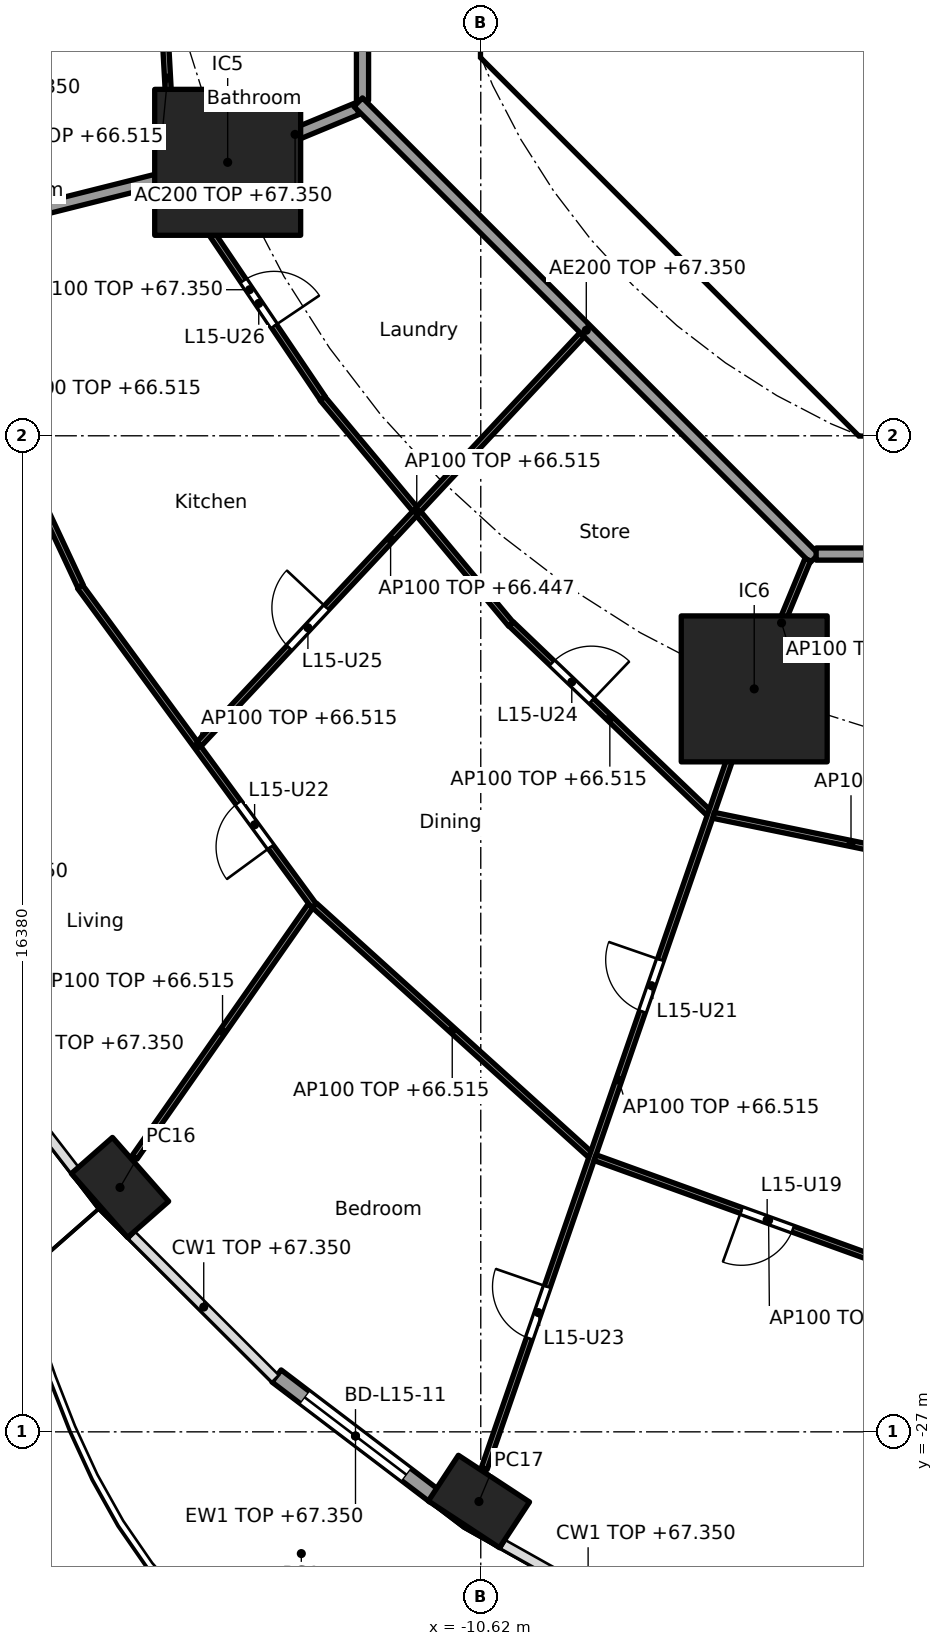
"""IFC4 building model, lengths in metres.
Left out: names, types, materials, properties, quantities, classifications, styles, units other than length and angle.
Written with IfcOpenShell. Run it as: python <this file> out.ifc"""

import sys

from ifc_helpers import new_model, si_unit, direction, frame, frame_2d, origin, origin_2d, place, context, subcontext, project, spatial, polyline, rectangle, hollow_rectangle, outline, extrude, element, fill, save


model = new_model("IFC4")
c1 = context("Model", 3, precision=1e-05, world=origin(), true_north=direction((0.0, 1.0)))
c2 = subcontext(c1, "Body", "Model", "MODEL_VIEW")
j1 = project(units=[si_unit("LENGTHUNIT", "METRE"), si_unit("PLANEANGLEUNIT", "RADIAN")], contexts=[c1])
p1 = place(None, origin())
s1 = spatial("IfcSite", under=j1, at=p1, CompositionType="ELEMENT")
p2 = place(p1, origin())
s2 = spatial("IfcBuilding", under=s1, at=p2, CompositionType="ELEMENT")
p3 = place(p2, frame((0.0, 0.0, 64.0)))
s3 = spatial("IfcBuildingStorey", under=s2, at=p3, CompositionType="ELEMENT", Elevation=64.0)
for number, where, z_axis, x_axis in (
    (1, (-16.552, -22.981, 0.0), (0.0, 0.0, 1.0), (0.66, -0.751, 0.0)),
    (2, (-10.65, -28.146, 0.0), (0.0, 0.0, 1.0), (0.836, -0.549, 0.0)),
):
    element("IfcColumn", number, at=place(p3, frame(where, z_axis=z_axis, x_axis=x_axis)), inside=s3, PredefinedType="COLUMN", context=c2, shape_type="SweptSolid", body=[
        extrude(hollow_rectangle(XDim=1.4, YDim=0.9, WallThickness=0.05, at=origin_2d()), origin(), (0.0, 0.0, 1.0), 3.7),
    ])
for number, where, z_axis, x_axis in (
    (3, (-14.782, -6.123, 0.0), (0.0, 0.0, 1.0), (1.0, 0.0, 0.0)),
    (4, (-6.123, -14.782, 0.0), (0.0, 0.0, 1.0), (1.0, 0.0, 0.0)),
):
    element("IfcColumn", number, at=place(p3, frame(where, z_axis=z_axis, x_axis=x_axis)), inside=s3, PredefinedType="COLUMN", context=c2, shape_type="SweptSolid", body=[
        extrude(rectangle(XDim=2.4, YDim=2.4, at=origin_2d()), origin(), (0.0, 0.0, 1.0), 3.7),
    ])
p4 = place(p3, frame((-11.382, -28.056, 0.0), z_axis=(0.0, 0.0, 1.0), x_axis=(-0.796022293214, 0.605267303517, 0.0)))
e5 = element("IfcWall", 5, at=p4, inside=s3, PredefinedType="SOLIDWALL", context=c2, shape_type="SweptSolid", body=[
    extrude(rectangle(XDim=3.262, YDim=0.25, at=frame_2d((1.631, 0.0))), origin(), (0.0, 0.0, 1.0), 3.35),
])
p5 = place(p4, frame((0.581, 0.0, 0.0)))
e6 = element("IfcOpeningElement", 6, at=p5, cuts=e5, PredefinedType="OPENING", context=c2, shape_type="SweptSolid", body=[
    extrude(rectangle(XDim=2.1, YDim=2.4, at=frame_2d((1.05, 1.2))), frame((0.0, 0.135, 0.0), z_axis=(0.0, -1.0, 0.0), x_axis=(1.0, 0.0, 0.0)), (0.0, 0.0, 1.0), 0.27),
])
p6 = place(p3, frame((-9.988, -4.613, 0.0), z_axis=(0.0, 0.0, 1.0), x_axis=(0.707106781187, -0.707106781187, 0.0)))
e7 = element("IfcWall", 7, at=p6, inside=s3, PredefinedType="SHEAR", context=c2, shape_type="SweptSolid", body=[
    extrude(rectangle(XDim=7.602, YDim=0.6, at=frame_2d((3.801, 0.0))), origin(), (0.0, 0.0, 1.0), 3.35),
])
p7 = place(p6, frame((6.151, 0.0, 0.0)))
e8 = element("IfcOpeningElement", 8, at=p7, cuts=e7, PredefinedType="OPENING", context=c2, shape_type="SweptSolid", body=[
    extrude(rectangle(XDim=1.1, YDim=2.1, at=frame_2d((0.55, 1.05))), frame((0.0, 0.31, 0.0), z_axis=(0.0, -1.0, 0.0), x_axis=(1.0, 0.0, 0.0)), (0.0, 0.0, 1.0), 0.62),
])
p8 = place(p3, frame((-7.4, -6.627, 0.0), z_axis=(0.0, 0.0, 1.0), x_axis=(0.0, 1.0, 0.0)))
e9 = element("IfcWall", 9, at=p8, inside=s3, PredefinedType="PARTITIONING", context=c2, shape_type="SweptSolid", body=[
    extrude(rectangle(XDim=2.527, YDim=0.15, at=frame_2d((1.263, 0.0))), origin(), (0.0, 0.0, 1.0), 3.35),
])
p9 = place(p8, frame((0.776, 0.0, 0.0)))
e10 = element("IfcOpeningElement", 10, at=p9, cuts=e9, PredefinedType="OPENING", context=c2, shape_type="SweptSolid", body=[
    extrude(rectangle(XDim=0.9, YDim=2.1, at=frame_2d((0.45, 1.05))), frame((0.0, 0.085, 0.0), z_axis=(0.0, -1.0, 0.0), x_axis=(1.0, 0.0, 0.0)), (0.0, 0.0, 1.0), 0.17),
])
p10 = place(p3, origin())
e11 = element("IfcWall", 11, at=p10, inside=s3, PredefinedType="SHEAR", context=c2, shape_type="SweptSolid", body=[
    extrude(outline(polyline([(-10.625, -3.801), (-10.025, -3.801), (-10.025, -4.152), (-9.776, -4.401), (-10.2, -4.825), (-10.625, -4.401), (-10.625, -3.801)])), origin(), (0.0, 0.0, 1.0), 3.35),
])
p11 = place(p3, origin())
e12 = element("IfcWall", 12, at=p11, inside=s3, PredefinedType="SHEAR", context=c2, shape_type="SweptSolid", body=[
    extrude(outline(polyline([(-4.152, -10.025), (4.152, -10.025), (4.401, -9.776), (4.825, -10.2), (4.401, -10.625), (-4.401, -10.625), (-4.825, -10.2), (-4.401, -9.776), (-4.152, -10.025)])), origin(), (0.0, 0.0, 1.0), 3.35),
])
p12 = place(p3, frame((-12.657, -5.243, 0.0), z_axis=(0.0, 0.0, 1.0), x_axis=(-0.923885664896, -0.382668627144, 0.0)))
e13 = element("IfcWall", 13, at=p12, inside=s3, PredefinedType="PARTITIONING", context=c2, shape_type="SweptSolid", body=[
    extrude(rectangle(XDim=2.2, YDim=0.2, at=frame_2d((1.1, 0.0))), origin(), (0.0, 0.0, 1.0), 3.35),
])
p13 = place(p3, frame((-14.831, -6.135, 0.0), z_axis=(0.0, 0.0, 1.0), x_axis=(-0.969884949569, -0.243563512454, 0.0)))
e14 = element("IfcWall", 14, at=p13, inside=s3, PredefinedType="PARTITIONING", context=c2, shape_type="SweptSolid", body=[
    extrude(rectangle(XDim=8.829, YDim=0.2, at=frame_2d((4.415, 0.0))), origin(), (0.0, 0.0, 1.0), 2.515),
])
p14 = place(p3, frame((-12.565, 5.304, 0.0), z_axis=(0.0, 0.0, 1.0), x_axis=(0.0, -1.0, 0.0)))
e15 = element("IfcWall", 15, at=p14, inside=s3, PredefinedType="PARTITIONING", context=c2, shape_type="SweptSolid", body=[
    extrude(rectangle(XDim=10.409, YDim=0.2, at=frame_2d((5.205, 0.0))), origin(), (0.0, 0.0, 1.0), 3.35),
])
p15 = place(p14, frame((6.106, 0.0, 0.0)))
e16 = element("IfcOpeningElement", 16, at=p15, cuts=e15, PredefinedType="OPENING", context=c2, shape_type="SweptSolid", body=[
    extrude(rectangle(XDim=1.0, YDim=2.1, at=frame_2d((0.5, 1.05))), frame((0.0, 0.11, 0.0), z_axis=(0.0, -1.0, 0.0), x_axis=(1.0, 0.0, 0.0)), (0.0, 0.0, 1.0), 0.22),
])
p16 = place(p3, frame((-12.635, -5.134, 0.0), z_axis=(0.0, 0.0, 1.0), x_axis=(0.707106781187, -0.707106781187, 0.0)))
e17 = element("IfcWall", 17, at=p16, inside=s3, PredefinedType="PARTITIONING", context=c2, shape_type="SweptSolid", body=[
    extrude(rectangle(XDim=10.609, YDim=0.2, at=frame_2d((5.305, 0.0))), origin(), (0.0, 0.0, 1.0), 3.35),
])
p17 = place(p3, frame((-5.104, -12.565, 0.0), z_axis=(0.0, 0.0, 1.0), x_axis=(1.0, 0.0, 0.0)))
e18 = element("IfcWall", 18, at=p17, inside=s3, PredefinedType="PARTITIONING", context=c2, shape_type="SweptSolid", body=[
    extrude(rectangle(XDim=10.409, YDim=0.2, at=frame_2d((5.205, 0.0))), origin(), (0.0, 0.0, 1.0), 3.35),
])
p18 = place(p3, frame((-15.854, -3.225, 0.0), z_axis=(0.0, 0.0, 1.0), x_axis=(0.054644199943, -0.998505889523, 0.0)))
e19 = element("IfcWall", 19, at=p18, inside=s3, PredefinedType="PARTITIONING", context=c2, shape_type="SweptSolid", body=[
    extrude(rectangle(XDim=3.029, YDim=0.1, at=frame_2d((1.515, 0.0))), origin(), (0.0, 0.0, 1.0), 2.515),
])
p19 = place(p3, frame((-15.627, -6.432, 0.0), z_axis=(0.0, 0.0, 1.0), x_axis=(0.559112679527, -0.829091678641, 0.0)))
e20 = element("IfcWall", 20, at=p19, inside=s3, PredefinedType="PARTITIONING", context=c2, shape_type="SweptSolid", body=[
    extrude(rectangle(XDim=4.308, YDim=0.1, at=frame_2d((2.154, 0.0))), origin(), (0.0, 0.0, 1.0), 3.35),
])
p20 = place(p19, frame((1.975, 0.0, 0.0)))
e21 = element("IfcOpeningElement", 21, at=p20, cuts=e20, PredefinedType="OPENING", context=c2, shape_type="SweptSolid", body=[
    extrude(rectangle(XDim=0.9, YDim=2.1, at=frame_2d((0.45, 1.05))), frame((0.0, 0.06, 0.0), z_axis=(0.0, -1.0, 0.0), x_axis=(1.0, 0.0, 0.0)), (0.0, 0.0, 1.0), 0.12),
])
p21 = place(p3, frame((-19.826, -7.491, 0.0), z_axis=(0.0, 0.0, 1.0), x_axis=(0.423926333401, -0.905696673202, 0.0)))
e22 = element("IfcWall", 22, at=p21, inside=s3, PredefinedType="PARTITIONING", context=c2, shape_type="SweptSolid", body=[
    extrude(rectangle(XDim=6.188, YDim=0.1, at=frame_2d((3.094, 0.0))), origin(), (0.0, 0.0, 1.0), 2.515),
])
p22 = place(p3, frame((-13.222, -10.007, 0.0), z_axis=(0.0, 0.0, 1.0), x_axis=(0.64083455704, -0.767679015282, 0.0)))
e23 = element("IfcWall", 23, at=p22, inside=s3, PredefinedType="PARTITIONING", context=c2, shape_type="SweptSolid", body=[
    extrude(rectangle(XDim=4.837, YDim=0.1, at=frame_2d((2.418, 0.0))), origin(), (0.0, 0.0, 1.0), 2.515),
])
p23 = place(p3, frame((-17.211, -13.1, 0.0), z_axis=(0.0, 0.0, 1.0), x_axis=(0.591191311491, -0.806531359104, 0.0)))
e24 = element("IfcWall", 24, at=p23, inside=s3, PredefinedType="PARTITIONING", context=c2, shape_type="SweptSolid", body=[
    extrude(rectangle(XDim=6.51, YDim=0.1, at=frame_2d((3.255, 0.0))), origin(), (0.0, 0.0, 1.0), 2.515),
])
p24 = place(p23, frame((4.407, 0.0, 0.0)))
e25 = element("IfcOpeningElement", 25, at=p24, cuts=e24, PredefinedType="OPENING", context=c2, shape_type="SweptSolid", body=[
    extrude(rectangle(XDim=0.9, YDim=2.1, at=frame_2d((0.45, 1.05))), frame((0.0, 0.06, 0.0), z_axis=(0.0, -1.0, 0.0), x_axis=(1.0, 0.0, 0.0)), (0.0, 0.0, 1.0), 0.12),
])
p25 = place(p3, frame((-8.953, -8.958, 0.0), z_axis=(0.0, 0.0, 1.0), x_axis=(-0.683322485948, -0.730116689439, 0.0)))
e26 = element("IfcWall", 26, at=p25, inside=s3, PredefinedType="PARTITIONING", context=c2, shape_type="SweptSolid", body=[
    extrude(rectangle(XDim=9.219, YDim=0.1, at=frame_2d((4.609, 0.0))), origin(), (0.0, 0.0, 1.0), 2.447),
])
p26 = place(p25, frame((6.149, 0.0, 0.0)))
e27 = element("IfcOpeningElement", 27, at=p26, cuts=e26, PredefinedType="OPENING", context=c2, shape_type="SweptSolid", body=[
    extrude(rectangle(XDim=0.9, YDim=2.1, at=frame_2d((0.45, 1.05))), frame((0.0, 0.06, 0.0), z_axis=(0.0, -1.0, 0.0), x_axis=(1.0, 0.0, 0.0)), (0.0, 0.0, 1.0), 0.12),
])
p27 = place(p3, frame((-10.119, -13.716, 0.0), z_axis=(0.0, 0.0, 1.0), x_axis=(0.722762371977, -0.691096631199, 0.0)))
e28 = element("IfcWall", 28, at=p27, inside=s3, PredefinedType="PARTITIONING", context=c2, shape_type="SweptSolid", body=[
    extrude(rectangle(XDim=4.487, YDim=0.1, at=frame_2d((2.244, 0.0))), origin(), (0.0, 0.0, 1.0), 2.515),
])
p28 = place(p27, frame((0.927, 0.0, 0.0)))
e29 = element("IfcOpeningElement", 29, at=p28, cuts=e28, PredefinedType="OPENING", context=c2, shape_type="SweptSolid", body=[
    extrude(rectangle(XDim=0.9, YDim=2.1, at=frame_2d((0.45, 1.05))), frame((0.0, 0.06, 0.0), z_axis=(0.0, -1.0, 0.0), x_axis=(1.0, 0.0, 0.0)), (0.0, 0.0, 1.0), 0.12),
])
p29 = place(p3, frame((-13.42, -18.351, 0.0), z_axis=(0.0, 0.0, 1.0), x_axis=(-0.573127875153, -0.819465947262, 0.0)))
e30 = element("IfcWall", 30, at=p29, inside=s3, PredefinedType="PARTITIONING", context=c2, shape_type="SweptSolid", body=[
    extrude(rectangle(XDim=5.047, YDim=0.1, at=frame_2d((2.523, 0.0))), origin(), (0.0, 0.0, 1.0), 2.515),
])
p30 = place(p3, frame((-13.355, -18.343, 0.0), z_axis=(0.0, 0.0, 1.0), x_axis=(0.741722263338, -0.670707152242, 0.0)))
e31 = element("IfcWall", 31, at=p30, inside=s3, PredefinedType="PARTITIONING", context=c2, shape_type="SweptSolid", body=[
    extrude(rectangle(XDim=6.109, YDim=0.1, at=frame_2d((3.055, 0.0))), origin(), (0.0, 0.0, 1.0), 2.515),
])
p31 = place(p3, frame((-5.243, -12.657, 0.0), z_axis=(0.0, 0.0, 1.0), x_axis=(-0.382719158442, -0.923864733477, 0.0)))
e32 = element("IfcWall", 32, at=p31, inside=s3, PredefinedType="PARTITIONING", context=c2, shape_type="SweptSolid", body=[
    extrude(rectangle(XDim=2.25, YDim=0.1, at=frame_2d((1.125, 0.0))), origin(), (0.0, 0.0, 1.0), 3.35),
])
p32 = place(p3, frame((-6.139, -14.829, 0.0), z_axis=(0.0, 0.0, 1.0), x_axis=(-0.327178799566, -0.944962450637, 0.0)))
e33 = element("IfcWall", 33, at=p32, inside=s3, PredefinedType="PARTITIONING", context=c2, shape_type="SweptSolid", body=[
    extrude(rectangle(XDim=13.517, YDim=0.1, at=frame_2d((6.759, 0.0))), origin(), (0.0, 0.0, 1.0), 2.515),
])
p33 = place(p32, frame((4.665, 0.0, 0.0)))
e34 = element("IfcOpeningElement", 34, at=p33, cuts=e33, PredefinedType="OPENING", context=c2, shape_type="SweptSolid", body=[
    extrude(rectangle(XDim=0.9, YDim=2.1, at=frame_2d((0.45, 1.05))), frame((0.0, 0.06, 0.0), z_axis=(0.0, -1.0, 0.0), x_axis=(1.0, 0.0, 0.0)), (0.0, 0.0, 1.0), 0.12),
])
p34 = place(p32, frame((10.354, 0.0, 0.0)))
e35 = element("IfcOpeningElement", 35, at=p34, cuts=e33, PredefinedType="OPENING", context=c2, shape_type="SweptSolid", body=[
    extrude(rectangle(XDim=0.9, YDim=2.1, at=frame_2d((0.45, 1.05))), frame((0.0, 0.06, 0.0), z_axis=(0.0, -1.0, 0.0), x_axis=(1.0, 0.0, 0.0)), (0.0, 0.0, 1.0), 0.12),
])
p35 = place(p3, frame((-6.791, -16.862, 0.0), z_axis=(0.0, 0.0, 1.0), x_axis=(0.979587203416, -0.2010196779, 0.0)))
e36 = element("IfcWall", 36, at=p35, inside=s3, PredefinedType="PARTITIONING", context=c2, shape_type="SweptSolid", body=[
    extrude(rectangle(XDim=4.613, YDim=0.1, at=frame_2d((2.306, 0.0))), origin(), (0.0, 0.0, 1.0), 2.515),
])
p36 = place(p3, frame((-8.739, -22.491, 0.0), z_axis=(0.0, 0.0, 1.0), x_axis=(0.940401691072, -0.340065669288, 0.0)))
e37 = element("IfcWall", 37, at=p36, inside=s3, PredefinedType="PARTITIONING", context=c2, shape_type="SweptSolid", body=[
    extrude(rectangle(XDim=6.067, YDim=0.1, at=frame_2d((3.034, 0.0))), origin(), (0.0, 0.0, 1.0), 2.515),
])
p37 = place(p36, frame((2.559, 0.0, 0.0)))
e38 = element("IfcOpeningElement", 38, at=p37, cuts=e37, PredefinedType="OPENING", context=c2, shape_type="SweptSolid", body=[
    extrude(rectangle(XDim=0.9, YDim=2.1, at=frame_2d((0.45, 1.05))), frame((0.0, 0.06, 0.0), z_axis=(0.0, -1.0, 0.0), x_axis=(1.0, 0.0, 0.0)), (0.0, 0.0, 1.0), 0.12),
])
p38 = place(p5, origin())
e39 = element("IfcDoor", 39, at=p38, inside=s3, OperationType="SLIDING_TO_LEFT", PredefinedType="DOOR", context=c2, shape_type="SweptSolid", body=[
    extrude(rectangle(XDim=2.1, YDim=2.4, at=frame_2d((1.05, 1.2))), frame((0.0, 0.025, 0.0), z_axis=(0.0, -1.0, 0.0), x_axis=(1.0, 0.0, 0.0)), (0.0, 0.0, 1.0), 0.05),
])
fill(e6, e39)
p39 = place(p9, origin())
e40 = element("IfcDoor", 40, at=p39, inside=s3, OperationType="SINGLE_SWING_LEFT", PredefinedType="DOOR", context=c2, shape_type="SweptSolid", body=[
    extrude(rectangle(XDim=0.9, YDim=2.1, at=frame_2d((0.45, 1.05))), frame((0.0, 0.025, 0.0), z_axis=(0.0, -1.0, 0.0), x_axis=(1.0, 0.0, 0.0)), (0.0, 0.0, 1.0), 0.05),
])
fill(e10, e40)
p40 = place(p7, origin())
e41 = element("IfcDoor", 41, at=p40, inside=s3, OperationType="SINGLE_SWING_RIGHT", PredefinedType="DOOR", context=c2, shape_type="SweptSolid", body=[
    extrude(rectangle(XDim=1.1, YDim=2.1, at=frame_2d((0.55, 1.05))), frame((0.0, 0.025, 0.0), z_axis=(0.0, -1.0, 0.0), x_axis=(1.0, 0.0, 0.0)), (0.0, 0.0, 1.0), 0.05),
])
fill(e8, e41)
p41 = place(p37, frame((0.9, 0.0, 0.0), x_axis=(-1.0, 0.0, 0.0)))
e42 = element("IfcDoor", 42, at=p41, inside=s3, OperationType="SINGLE_SWING_RIGHT", PredefinedType="DOOR", context=c2, shape_type="SweptSolid", body=[
    extrude(rectangle(XDim=0.9, YDim=2.1, at=frame_2d((0.45, 1.05))), frame((0.0, 0.025, 0.0), z_axis=(0.0, -1.0, 0.0), x_axis=(1.0, 0.0, 0.0)), (0.0, 0.0, 1.0), 0.05),
])
fill(e38, e42)
p42 = place(p33, frame((0.9, 0.0, 0.0), x_axis=(-1.0, 0.0, 0.0)))
e43 = element("IfcDoor", 43, at=p42, inside=s3, OperationType="SINGLE_SWING_RIGHT", PredefinedType="DOOR", context=c2, shape_type="SweptSolid", body=[
    extrude(rectangle(XDim=0.9, YDim=2.1, at=frame_2d((0.45, 1.05))), frame((0.0, 0.025, 0.0), z_axis=(0.0, -1.0, 0.0), x_axis=(1.0, 0.0, 0.0)), (0.0, 0.0, 1.0), 0.05),
])
fill(e34, e43)
p43 = place(p24, frame((0.9, 0.0, 0.0), x_axis=(-1.0, 0.0, 0.0)))
e44 = element("IfcDoor", 44, at=p43, inside=s3, OperationType="SINGLE_SWING_LEFT", PredefinedType="DOOR", context=c2, shape_type="SweptSolid", body=[
    extrude(rectangle(XDim=0.9, YDim=2.1, at=frame_2d((0.45, 1.05))), frame((0.0, 0.025, 0.0), z_axis=(0.0, -1.0, 0.0), x_axis=(1.0, 0.0, 0.0)), (0.0, 0.0, 1.0), 0.05),
])
fill(e25, e44)
p44 = place(p34, frame((0.9, 0.0, 0.0), x_axis=(-1.0, 0.0, 0.0)))
e45 = element("IfcDoor", 45, at=p44, inside=s3, OperationType="SINGLE_SWING_RIGHT", PredefinedType="DOOR", context=c2, shape_type="SweptSolid", body=[
    extrude(rectangle(XDim=0.9, YDim=2.1, at=frame_2d((0.45, 1.05))), frame((0.0, 0.025, 0.0), z_axis=(0.0, -1.0, 0.0), x_axis=(1.0, 0.0, 0.0)), (0.0, 0.0, 1.0), 0.05),
])
fill(e35, e45)
p45 = place(p28, origin())
e46 = element("IfcDoor", 46, at=p45, inside=s3, OperationType="SINGLE_SWING_RIGHT", PredefinedType="DOOR", context=c2, shape_type="SweptSolid", body=[
    extrude(rectangle(XDim=0.9, YDim=2.1, at=frame_2d((0.45, 1.05))), frame((0.0, 0.025, 0.0), z_axis=(0.0, -1.0, 0.0), x_axis=(1.0, 0.0, 0.0)), (0.0, 0.0, 1.0), 0.05),
])
fill(e29, e46)
p46 = place(p26, frame((0.9, 0.0, 0.0), x_axis=(-1.0, 0.0, 0.0)))
e47 = element("IfcDoor", 47, at=p46, inside=s3, OperationType="SINGLE_SWING_RIGHT", PredefinedType="DOOR", context=c2, shape_type="SweptSolid", body=[
    extrude(rectangle(XDim=0.9, YDim=2.1, at=frame_2d((0.45, 1.05))), frame((0.0, 0.025, 0.0), z_axis=(0.0, -1.0, 0.0), x_axis=(1.0, 0.0, 0.0)), (0.0, 0.0, 1.0), 0.05),
])
fill(e27, e47)
p47 = place(p20, origin())
e48 = element("IfcDoor", 48, at=p47, inside=s3, OperationType="SINGLE_SWING_RIGHT", PredefinedType="DOOR", context=c2, shape_type="SweptSolid", body=[
    extrude(rectangle(XDim=0.9, YDim=2.1, at=frame_2d((0.45, 1.05))), frame((0.0, 0.025, 0.0), z_axis=(0.0, -1.0, 0.0), x_axis=(1.0, 0.0, 0.0)), (0.0, 0.0, 1.0), 0.05),
])
fill(e21, e48)
save(model, sys.argv[1])
